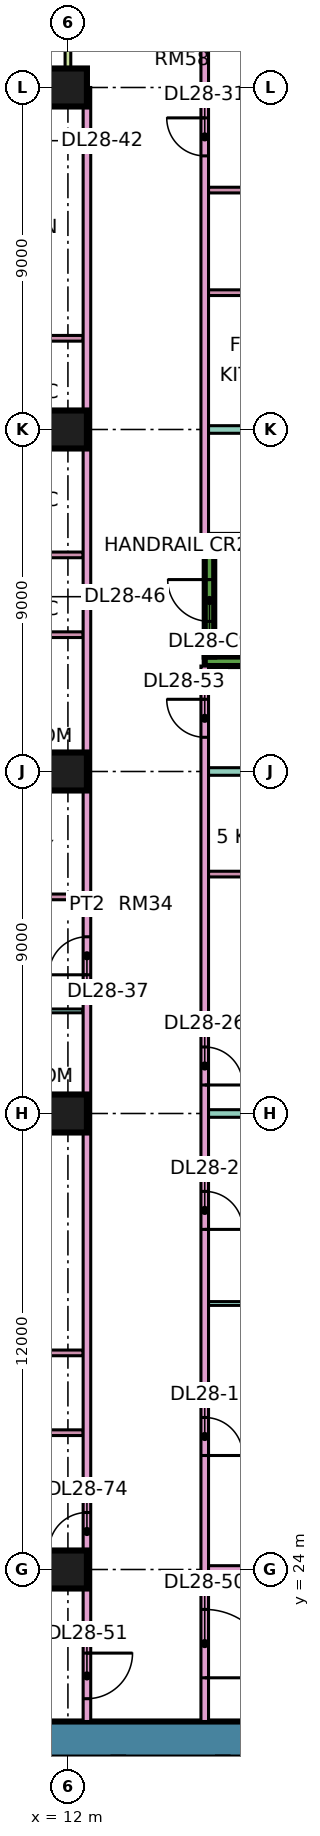
"""IFC4 building model, lengths in metres.
Left out: names, types, materials, properties, quantities, classifications, styles, units other than length and angle.
Written with IfcOpenShell. Run it as: python <this file> out.ifc"""

import sys

from ifc_helpers import new_model, si_unit, direction, frame, frame_2d, origin, origin_2d, place, context, subcontext, project, spatial, rectangle, extrude, element, fill, save


model = new_model("IFC4")
c1 = context("Model", 3, precision=1e-05, world=origin(), true_north=direction((0.0, 1.0)))
c2 = subcontext(c1, "Body", "Model", "MODEL_VIEW")
j1 = project(units=[si_unit("LENGTHUNIT", "METRE"), si_unit("PLANEANGLEUNIT", "RADIAN")], contexts=[c1])
p1 = place(None, origin())
s1 = spatial("IfcSite", under=j1, at=p1, CompositionType="ELEMENT")
p2 = place(p1, origin())
s2 = spatial("IfcBuilding", under=s1, at=p2, CompositionType="ELEMENT")
p3 = place(p2, frame((0.0, 0.0, 121.9)))
s3 = spatial("IfcBuildingStorey", under=s2, at=p3, CompositionType="ELEMENT", Elevation=121.9)
for number, where, z_axis, x_axis in (
    (1, (12.0, 24.0, 0.0), (0.0, 0.0, 1.0), (1.0, 0.0, 0.0)),
    (2, (12.0, 36.0, 0.0), (0.0, 0.0, 1.0), (1.0, 0.0, 0.0)),
    (3, (12.0, 45.0, 0.0), (0.0, 0.0, 1.0), (1.0, 0.0, 0.0)),
    (4, (12.0, 54.0, 0.0), (0.0, 0.0, 1.0), (1.0, 0.0, 0.0)),
    (5, (12.0, 63.0, 0.0), (0.0, 0.0, 1.0), (1.0, 0.0, 0.0)),
):
    element("IfcColumn", number, at=place(p3, frame(where, z_axis=z_axis, x_axis=x_axis)), inside=s3, PredefinedType="COLUMN", context=c2, shape_type="SweptSolid", body=[
        extrude(rectangle(XDim=1.0, YDim=1.0, at=origin_2d()), origin(), (0.0, 0.0, 1.0), 3.75),
    ])
p4 = place(p3, frame((9.0, 19.525, 0.0), z_axis=(0.0, 0.0, 1.0), x_axis=(1.0, 0.0, 0.0)))
e6 = element("IfcWall", 6, at=p4, inside=s3, PredefinedType="SHEAR", context=c2, shape_type="SweptSolid", body=[
    extrude(rectangle(XDim=25.0, YDim=0.95, at=frame_2d((12.5, 0.0))), origin(), (0.0, 0.0, 1.0), 3.75),
])
p5 = place(p4, frame((19.1, 0.0, 0.0)))
e7 = element("IfcOpeningElement", 7, at=p5, cuts=e6, PredefinedType="OPENING", context=c2, shape_type="SweptSolid", body=[
    extrude(rectangle(XDim=1.8, YDim=2.4, at=frame_2d((0.9, 1.2))), frame((0.0, 0.485, 0.0), z_axis=(0.0, -1.0, 0.0), x_axis=(1.0, 0.0, 0.0)), (0.0, 0.0, 1.0), 0.97),
])
for number, where, z_axis, x_axis in (
    (8, (15.6, 47.9, 0.0), (0.0, 0.0, 1.0), (1.0, 0.0, 0.0)),
    (9, (15.6, 51.1, 0.0), (0.0, 0.0, 1.0), (1.0, 0.0, 0.0)),
):
    element("IfcWall", number, at=place(p3, frame(where, z_axis=z_axis, x_axis=x_axis)), inside=s3, PredefinedType="SHEAR", context=c2, shape_type="SweptSolid", body=[
        extrude(rectangle(XDim=7.0, YDim=0.25, at=frame_2d((3.5, 0.0))), origin(), (0.0, 0.0, 1.0), 3.75),
    ])
p6 = place(p3, frame((15.725, 48.025, 0.0), z_axis=(0.0, 0.0, 1.0), x_axis=(0.0, 1.0, 0.0)))
e10 = element("IfcWall", 10, at=p6, inside=s3, PredefinedType="SHEAR", context=c2, shape_type="SweptSolid", body=[
    extrude(rectangle(XDim=2.95, YDim=0.25, at=frame_2d((1.475, 0.0))), origin(), (0.0, 0.0, 1.0), 3.75),
])
p7 = place(p6, frame((0.925, 0.0, 0.0)))
e11 = element("IfcOpeningElement", 11, at=p7, cuts=e10, PredefinedType="OPENING", context=c2, shape_type="SweptSolid", body=[
    extrude(rectangle(XDim=1.1, YDim=2.2, at=frame_2d((0.55, 1.1))), frame((0.0, 0.135, 0.0), z_axis=(0.0, -1.0, 0.0), x_axis=(1.0, 0.0, 0.0)), (0.0, 0.0, 1.0), 0.27),
])
p8 = place(p3, frame((11.925, 63.0, 0.0), z_axis=(0.0, 0.0, 1.0), x_axis=(-1.0, 0.0, 0.0)))
e12 = element("IfcWall", 12, at=p8, inside=s3, PredefinedType="SOLIDWALL", context=c2, shape_type="SweptSolid", body=[
    extrude(rectangle(XDim=10.35, YDim=0.15, at=frame_2d((5.175, 0.0))), origin(), (0.0, 0.0, 1.0), 3.35),
])
p9 = place(p8, frame((0.875, 0.0, 0.45)))
e13 = element("IfcOpeningElement", 13, at=p9, cuts=e12, PredefinedType="OPENING", context=c2, shape_type="SweptSolid", body=[
    extrude(rectangle(XDim=2.4, YDim=2.4, at=frame_2d((1.2, 1.2))), frame((0.0, 0.085, 0.0), z_axis=(0.0, -1.0, 0.0), x_axis=(1.0, 0.0, 0.0)), (0.0, 0.0, 1.0), 0.17),
])
p10 = place(p8, frame((6.688, 0.0, 0.0)))
e14 = element("IfcOpeningElement", 14, at=p10, cuts=e12, PredefinedType="OPENING", context=c2, shape_type="SweptSolid", body=[
    extrude(rectangle(XDim=1.8, YDim=2.4, at=frame_2d((0.9, 1.2))), frame((0.0, 0.085, 0.0), z_axis=(0.0, -1.0, 0.0), x_axis=(1.0, 0.0, 0.0)), (0.0, 0.0, 1.0), 0.17),
])
p11 = place(p3, frame((12.0, 64.5, 0.0), z_axis=(0.0, 0.0, 1.0), x_axis=(0.0, -1.0, 0.0)))
e15 = element("IfcWall", 15, at=p11, inside=s3, PredefinedType="SOLIDWALL", context=c2, shape_type="SweptSolid", body=[
    extrude(rectangle(XDim=1.5, YDim=0.15, at=frame_2d((0.75, 0.0))), origin(), (0.0, 0.0, 1.0), 3.35),
])
p12 = place(p3, frame((-1.35, 22.4, 0.0), z_axis=(0.0, 0.0, 1.0), x_axis=(1.0, 0.0, 0.0)))
e16 = element("IfcWall", 16, at=p12, inside=s3, PredefinedType="PARTITIONING", context=c2, shape_type="SweptSolid", body=[
    extrude(rectangle(XDim=13.75, YDim=0.2, at=frame_2d((6.875, 0.0))), origin(), (0.0, 0.0, 1.0), 3.35),
])
p13 = place(p3, frame((0.0, 36.0, 0.0), z_axis=(0.0, 0.0, 1.0), x_axis=(1.0, 0.0, 0.0)))
e17 = element("IfcWall", 17, at=p13, inside=s3, PredefinedType="PARTITIONING", context=c2, shape_type="SweptSolid", body=[
    extrude(rectangle(XDim=12.4, YDim=0.2, at=frame_2d((6.2, 0.0))), origin(), (0.0, 0.0, 1.0), 3.35),
])
for number, where, z_axis, x_axis in (
    (18, (7.175, 27.6, 0.0), (0.0, 0.0, 1.0), (1.0, 0.0, 0.0)),
    (19, (7.175, 29.7, 0.0), (0.0, 0.0, 1.0), (1.0, 0.0, 0.0)),
):
    element("IfcWall", number, at=place(p3, frame(where, z_axis=z_axis, x_axis=x_axis)), inside=s3, PredefinedType="PARTITIONING", context=c2, shape_type="SweptSolid", body=[
        extrude(rectangle(XDim=5.225, YDim=0.15, at=frame_2d((2.612, 0.0))), origin(), (0.0, 0.0, 1.0), 3.35),
    ])
p14 = place(p3, frame((8.25, 38.7, 0.0), z_axis=(0.0, 0.0, 1.0), x_axis=(1.0, 0.0, 0.0)))
e20 = element("IfcWall", 20, at=p14, inside=s3, PredefinedType="PARTITIONING", context=c2, shape_type="SweptSolid", body=[
    extrude(rectangle(XDim=4.15, YDim=0.1, at=frame_2d((2.075, 0.0))), origin(), (0.0, 0.0, 1.0), 3.35),
])
p15 = place(p14, frame((1.7, 0.0, 0.0)))
e21 = element("IfcOpeningElement", 21, at=p15, cuts=e20, PredefinedType="OPENING", context=c2, shape_type="SweptSolid", body=[
    extrude(rectangle(XDim=0.9, YDim=2.1, at=frame_2d((0.45, 1.05))), frame((0.0, 0.06, 0.0), z_axis=(0.0, -1.0, 0.0), x_axis=(1.0, 0.0, 0.0)), (0.0, 0.0, 1.0), 0.12),
])
for number, where, z_axis, x_axis in (
    (22, (8.375, 41.7, 0.0), (0.0, 0.0, 1.0), (1.0, 0.0, 0.0)),
    (23, (8.375, 45.0, 0.0), (0.0, 0.0, 1.0), (1.0, 0.0, 0.0)),
    (24, (8.375, 48.6, 0.0), (0.0, 0.0, 1.0), (1.0, 0.0, 0.0)),
    (25, (8.375, 50.7, 0.0), (0.0, 0.0, 1.0), (1.0, 0.0, 0.0)),
    (26, (8.375, 54.3, 0.0), (0.0, 0.0, 1.0), (1.0, 0.0, 0.0)),
    (27, (8.375, 56.4, 0.0), (0.0, 0.0, 1.0), (1.0, 0.0, 0.0)),
):
    element("IfcWall", number, at=place(p3, frame(where, z_axis=z_axis, x_axis=x_axis)), inside=s3, PredefinedType="PARTITIONING", context=c2, shape_type="SweptSolid", body=[
        extrude(rectangle(XDim=4.025, YDim=0.15, at=frame_2d((2.012, 0.0))), origin(), (0.0, 0.0, 1.0), 3.35),
    ])
p16 = place(p3, frame((12.5, 20.0, 0.0), z_axis=(0.0, 0.0, 1.0), x_axis=(0.0, 1.0, 0.0)))
e28 = element("IfcWall", 28, at=p16, inside=s3, PredefinedType="PARTITIONING", context=c2, shape_type="SweptSolid", body=[
    extrude(rectangle(XDim=43.0, YDim=0.2, at=frame_2d((21.5, 0.0))), origin(), (0.0, 0.0, 1.0), 3.35),
])
p17 = place(p16, frame((19.65, 0.0, 0.0)))
e29 = element("IfcOpeningElement", 29, at=p17, cuts=e28, PredefinedType="OPENING", context=c2, shape_type="SweptSolid", body=[
    extrude(rectangle(XDim=1.0, YDim=2.1, at=frame_2d((0.5, 1.05))), frame((0.0, 0.11, 0.0), z_axis=(0.0, -1.0, 0.0), x_axis=(1.0, 0.0, 0.0)), (0.0, 0.0, 1.0), 0.22),
])
p18 = place(p16, frame((0.6, 0.0, 0.0)))
e30 = element("IfcOpeningElement", 30, at=p18, cuts=e28, PredefinedType="OPENING", context=c2, shape_type="SweptSolid", body=[
    extrude(rectangle(XDim=1.2, YDim=2.1, at=frame_2d((0.6, 1.05))), frame((0.0, 0.11, 0.0), z_axis=(0.0, -1.0, 0.0), x_axis=(1.0, 0.0, 0.0)), (0.0, 0.0, 1.0), 0.22),
])
p19 = place(p16, frame((4.5, 0.0, 0.0)))
e31 = element("IfcOpeningElement", 31, at=p19, cuts=e28, PredefinedType="OPENING", context=c2, shape_type="SweptSolid", body=[
    extrude(rectangle(XDim=1.0, YDim=2.1, at=frame_2d((0.5, 1.05))), frame((0.0, 0.11, 0.0), z_axis=(0.0, -1.0, 0.0), x_axis=(1.0, 0.0, 0.0)), (0.0, 0.0, 1.0), 0.22),
])
p20 = place(p3, frame((15.6, 20.0, 0.0), z_axis=(0.0, 0.0, 1.0), x_axis=(0.0, 1.0, 0.0)))
e32 = element("IfcWall", 32, at=p20, inside=s3, PredefinedType="PARTITIONING", context=c2, shape_type="SweptSolid", body=[
    extrude(rectangle(XDim=27.775, YDim=0.2, at=frame_2d((13.887, 0.0))), origin(), (0.0, 0.0, 1.0), 3.35),
])
p21 = place(p20, frame((7.0, 0.0, 0.0)))
e33 = element("IfcOpeningElement", 33, at=p21, cuts=e32, PredefinedType="OPENING", context=c2, shape_type="SweptSolid", body=[
    extrude(rectangle(XDim=1.0, YDim=2.1, at=frame_2d((0.5, 1.05))), frame((0.0, 0.11, 0.0), z_axis=(0.0, -1.0, 0.0), x_axis=(1.0, 0.0, 0.0)), (0.0, 0.0, 1.0), 0.22),
])
p22 = place(p20, frame((12.95, 0.0, 0.0)))
e34 = element("IfcOpeningElement", 34, at=p22, cuts=e32, PredefinedType="OPENING", context=c2, shape_type="SweptSolid", body=[
    extrude(rectangle(XDim=1.0, YDim=2.1, at=frame_2d((0.5, 1.05))), frame((0.0, 0.11, 0.0), z_axis=(0.0, -1.0, 0.0), x_axis=(1.0, 0.0, 0.0)), (0.0, 0.0, 1.0), 0.22),
])
p23 = place(p20, frame((16.75, 0.0, 0.0)))
e35 = element("IfcOpeningElement", 35, at=p23, cuts=e32, PredefinedType="OPENING", context=c2, shape_type="SweptSolid", body=[
    extrude(rectangle(XDim=1.0, YDim=2.1, at=frame_2d((0.5, 1.05))), frame((0.0, 0.11, 0.0), z_axis=(0.0, -1.0, 0.0), x_axis=(1.0, 0.0, 0.0)), (0.0, 0.0, 1.0), 0.22),
])
p24 = place(p20, frame((1.15, 0.0, 0.0)))
e36 = element("IfcOpeningElement", 36, at=p24, cuts=e32, PredefinedType="OPENING", context=c2, shape_type="SweptSolid", body=[
    extrude(rectangle(XDim=1.8, YDim=2.1, at=frame_2d((0.9, 1.05))), frame((0.0, 0.11, 0.0), z_axis=(0.0, -1.0, 0.0), x_axis=(1.0, 0.0, 0.0)), (0.0, 0.0, 1.0), 0.22),
])
p25 = place(p20, frame((25.9, 0.0, 0.0)))
e37 = element("IfcOpeningElement", 37, at=p25, cuts=e32, PredefinedType="OPENING", context=c2, shape_type="SweptSolid", body=[
    extrude(rectangle(XDim=1.0, YDim=2.1, at=frame_2d((0.5, 1.05))), frame((0.0, 0.11, 0.0), z_axis=(0.0, -1.0, 0.0), x_axis=(1.0, 0.0, 0.0)), (0.0, 0.0, 1.0), 0.22),
])
p26 = place(p3, frame((15.6, 51.225, 0.0), z_axis=(0.0, 0.0, 1.0), x_axis=(0.0, 1.0, 0.0)))
e38 = element("IfcWall", 38, at=p26, inside=s3, PredefinedType="PARTITIONING", context=c2, shape_type="SweptSolid", body=[
    extrude(rectangle(XDim=13.125, YDim=0.2, at=frame_2d((6.562, 0.0))), origin(), (0.0, 0.0, 1.0), 3.35),
])
p27 = place(p26, frame((9.975, 0.0, 0.0)))
e39 = element("IfcOpeningElement", 39, at=p27, cuts=e38, PredefinedType="OPENING", context=c2, shape_type="SweptSolid", body=[
    extrude(rectangle(XDim=1.0, YDim=2.1, at=frame_2d((0.5, 1.05))), frame((0.0, 0.11, 0.0), z_axis=(0.0, -1.0, 0.0), x_axis=(1.0, 0.0, 0.0)), (0.0, 0.0, 1.0), 0.22),
])
p28 = place(p3, frame((15.7, 24.0, 0.0), z_axis=(0.0, 0.0, 1.0), x_axis=(1.0, 0.0, 0.0)))
e40 = element("IfcWall", 40, at=p28, inside=s3, PredefinedType="PARTITIONING", context=c2, shape_type="SweptSolid", body=[
    extrude(rectangle(XDim=5.8, YDim=0.2, at=frame_2d((2.9, 0.0))), origin(), (0.0, 0.0, 1.0), 3.35),
])
p29 = place(p3, frame((15.7, 31.0, 0.0), z_axis=(0.0, 0.0, 1.0), x_axis=(1.0, 0.0, 0.0)))
e41 = element("IfcWall", 41, at=p29, inside=s3, PredefinedType="PARTITIONING", context=c2, shape_type="SweptSolid", body=[
    extrude(rectangle(XDim=5.8, YDim=0.1, at=frame_2d((2.9, 0.0))), origin(), (0.0, 0.0, 1.0), 3.35),
])
p30 = place(p3, frame((15.7, 36.0, 0.0), z_axis=(0.0, 0.0, 1.0), x_axis=(1.0, 0.0, 0.0)))
e42 = element("IfcWall", 42, at=p30, inside=s3, PredefinedType="PARTITIONING", context=c2, shape_type="SweptSolid", body=[
    extrude(rectangle(XDim=8.3, YDim=0.2, at=frame_2d((4.15, 0.0))), origin(), (0.0, 0.0, 1.0), 3.35),
])
for number, where, z_axis, x_axis in (
    (43, (15.7, 38.4, 0.0), (0.0, 0.0, 1.0), (1.0, 0.0, 0.0)),
    (44, (15.7, 42.3, 0.0), (0.0, 0.0, 1.0), (1.0, 0.0, 0.0)),
):
    element("IfcWall", number, at=place(p3, frame(where, z_axis=z_axis, x_axis=x_axis)), inside=s3, PredefinedType="PARTITIONING", context=c2, shape_type="SweptSolid", body=[
        extrude(rectangle(XDim=3.125, YDim=0.15, at=frame_2d((1.562, 0.0))), origin(), (0.0, 0.0, 1.0), 3.35),
    ])
p31 = place(p3, frame((15.7, 45.0, 0.0), z_axis=(0.0, 0.0, 1.0), x_axis=(1.0, 0.0, 0.0)))
e45 = element("IfcWall", 45, at=p31, inside=s3, PredefinedType="PARTITIONING", context=c2, shape_type="SweptSolid", body=[
    extrude(rectangle(XDim=8.3, YDim=0.2, at=frame_2d((4.15, 0.0))), origin(), (0.0, 0.0, 1.0), 3.35),
])
p32 = place(p3, frame((15.7, 54.0, 0.0), z_axis=(0.0, 0.0, 1.0), x_axis=(1.0, 0.0, 0.0)))
e46 = element("IfcWall", 46, at=p32, inside=s3, PredefinedType="PARTITIONING", context=c2, shape_type="SweptSolid", body=[
    extrude(rectangle(XDim=8.226, YDim=0.2, at=frame_2d((4.113, 0.0))), origin(), (0.0, 0.0, 1.0), 3.35),
])
for number, where, z_axis, x_axis in (
    (47, (15.7, 57.6, 0.0), (0.0, 0.0, 1.0), (1.0, 0.0, 0.0)),
    (48, (15.7, 60.3, 0.0), (0.0, 0.0, 1.0), (1.0, 0.0, 0.0)),
):
    element("IfcWall", number, at=place(p3, frame(where, z_axis=z_axis, x_axis=x_axis)), inside=s3, PredefinedType="PARTITIONING", context=c2, shape_type="SweptSolid", body=[
        extrude(rectangle(XDim=2.825, YDim=0.15, at=frame_2d((1.413, 0.0))), origin(), (0.0, 0.0, 1.0), 3.35),
    ])
p33 = place(p7, frame((1.1, 0.0, 0.0), z_axis=(0.0, 0.0, 1.0), x_axis=(-1.0, 0.0, 0.0)))
e49 = element("IfcDoor", 49, at=p33, inside=s3, OperationType="SINGLE_SWING_RIGHT", PredefinedType="DOOR", context=c2, shape_type="SweptSolid", body=[
    extrude(rectangle(XDim=1.1, YDim=2.2, at=frame_2d((0.55, 1.1))), frame((0.0, 0.025, 0.0), z_axis=(0.0, -1.0, 0.0), x_axis=(1.0, 0.0, 0.0)), (0.0, 0.0, 1.0), 0.05),
])
fill(e11, e49)
p34 = place(p21, frame((1.0, 0.0, 0.0), z_axis=(0.0, 0.0, 1.0), x_axis=(-1.0, 0.0, 0.0)))
e50 = element("IfcDoor", 50, at=p34, inside=s3, OperationType="SINGLE_SWING_LEFT", PredefinedType="DOOR", context=c2, shape_type="SweptSolid", body=[
    extrude(rectangle(XDim=1.0, YDim=2.1, at=frame_2d((0.5, 1.05))), frame((0.0, 0.025, 0.0), z_axis=(0.0, -1.0, 0.0), x_axis=(1.0, 0.0, 0.0)), (0.0, 0.0, 1.0), 0.05),
])
fill(e33, e50)
p35 = place(p22, frame((1.0, 0.0, 0.0), z_axis=(0.0, 0.0, 1.0), x_axis=(-1.0, 0.0, 0.0)))
e51 = element("IfcDoor", 51, at=p35, inside=s3, OperationType="SINGLE_SWING_LEFT", PredefinedType="DOOR", context=c2, shape_type="SweptSolid", body=[
    extrude(rectangle(XDim=1.0, YDim=2.1, at=frame_2d((0.5, 1.05))), frame((0.0, 0.025, 0.0), z_axis=(0.0, -1.0, 0.0), x_axis=(1.0, 0.0, 0.0)), (0.0, 0.0, 1.0), 0.05),
])
fill(e34, e51)
p36 = place(p23, frame((1.0, 0.0, 0.0), z_axis=(0.0, 0.0, 1.0), x_axis=(-1.0, 0.0, 0.0)))
e52 = element("IfcDoor", 52, at=p36, inside=s3, OperationType="SINGLE_SWING_LEFT", PredefinedType="DOOR", context=c2, shape_type="SweptSolid", body=[
    extrude(rectangle(XDim=1.0, YDim=2.1, at=frame_2d((0.5, 1.05))), frame((0.0, 0.025, 0.0), z_axis=(0.0, -1.0, 0.0), x_axis=(1.0, 0.0, 0.0)), (0.0, 0.0, 1.0), 0.05),
])
fill(e35, e52)
p37 = place(p27, frame((1.0, 0.0, 0.0), z_axis=(0.0, 0.0, 1.0), x_axis=(-1.0, 0.0, 0.0)))
e53 = element("IfcDoor", 53, at=p37, inside=s3, OperationType="SINGLE_SWING_RIGHT", PredefinedType="DOOR", context=c2, shape_type="SweptSolid", body=[
    extrude(rectangle(XDim=1.0, YDim=2.1, at=frame_2d((0.5, 1.05))), frame((0.0, 0.025, 0.0), z_axis=(0.0, -1.0, 0.0), x_axis=(1.0, 0.0, 0.0)), (0.0, 0.0, 1.0), 0.05),
])
fill(e39, e53)
p38 = place(p17, origin())
e54 = element("IfcDoor", 54, at=p38, inside=s3, OperationType="SINGLE_SWING_LEFT", PredefinedType="DOOR", context=c2, shape_type="SweptSolid", body=[
    extrude(rectangle(XDim=1.0, YDim=2.1, at=frame_2d((0.5, 1.05))), frame((0.0, 0.025, 0.0), z_axis=(0.0, -1.0, 0.0), x_axis=(1.0, 0.0, 0.0)), (0.0, 0.0, 1.0), 0.05),
])
fill(e29, e54)
p39 = place(p24, frame((1.8, 0.0, 0.0), z_axis=(0.0, 0.0, 1.0), x_axis=(-1.0, 0.0, 0.0)))
e55 = element("IfcDoor", 55, at=p39, inside=s3, OperationType="DOUBLE_DOOR_SINGLE_SWING", PredefinedType="DOOR", context=c2, shape_type="SweptSolid", body=[
    extrude(rectangle(XDim=1.8, YDim=2.1, at=frame_2d((0.9, 1.05))), frame((0.0, 0.025, 0.0), z_axis=(0.0, -1.0, 0.0), x_axis=(1.0, 0.0, 0.0)), (0.0, 0.0, 1.0), 0.05),
])
fill(e36, e55)
p40 = place(p18, origin())
e56 = element("IfcDoor", 56, at=p40, inside=s3, OperationType="SINGLE_SWING_RIGHT", PredefinedType="DOOR", context=c2, shape_type="SweptSolid", body=[
    extrude(rectangle(XDim=1.2, YDim=2.1, at=frame_2d((0.6, 1.05))), frame((0.0, 0.025, 0.0), z_axis=(0.0, -1.0, 0.0), x_axis=(1.0, 0.0, 0.0)), (0.0, 0.0, 1.0), 0.05),
])
fill(e30, e56)
p41 = place(p25, frame((1.0, 0.0, 0.0), z_axis=(0.0, 0.0, 1.0), x_axis=(-1.0, 0.0, 0.0)))
e57 = element("IfcDoor", 57, at=p41, inside=s3, OperationType="SINGLE_SWING_RIGHT", PredefinedType="DOOR", context=c2, shape_type="SweptSolid", body=[
    extrude(rectangle(XDim=1.0, YDim=2.1, at=frame_2d((0.5, 1.05))), frame((0.0, 0.025, 0.0), z_axis=(0.0, -1.0, 0.0), x_axis=(1.0, 0.0, 0.0)), (0.0, 0.0, 1.0), 0.05),
])
fill(e37, e57)
p42 = place(p19, origin())
e58 = element("IfcDoor", 58, at=p42, inside=s3, OperationType="SINGLE_SWING_LEFT", PredefinedType="DOOR", context=c2, shape_type="SweptSolid", body=[
    extrude(rectangle(XDim=1.0, YDim=2.1, at=frame_2d((0.5, 1.05))), frame((0.0, 0.025, 0.0), z_axis=(0.0, -1.0, 0.0), x_axis=(1.0, 0.0, 0.0)), (0.0, 0.0, 1.0), 0.05),
])
fill(e31, e58)
save(model, sys.argv[1])
